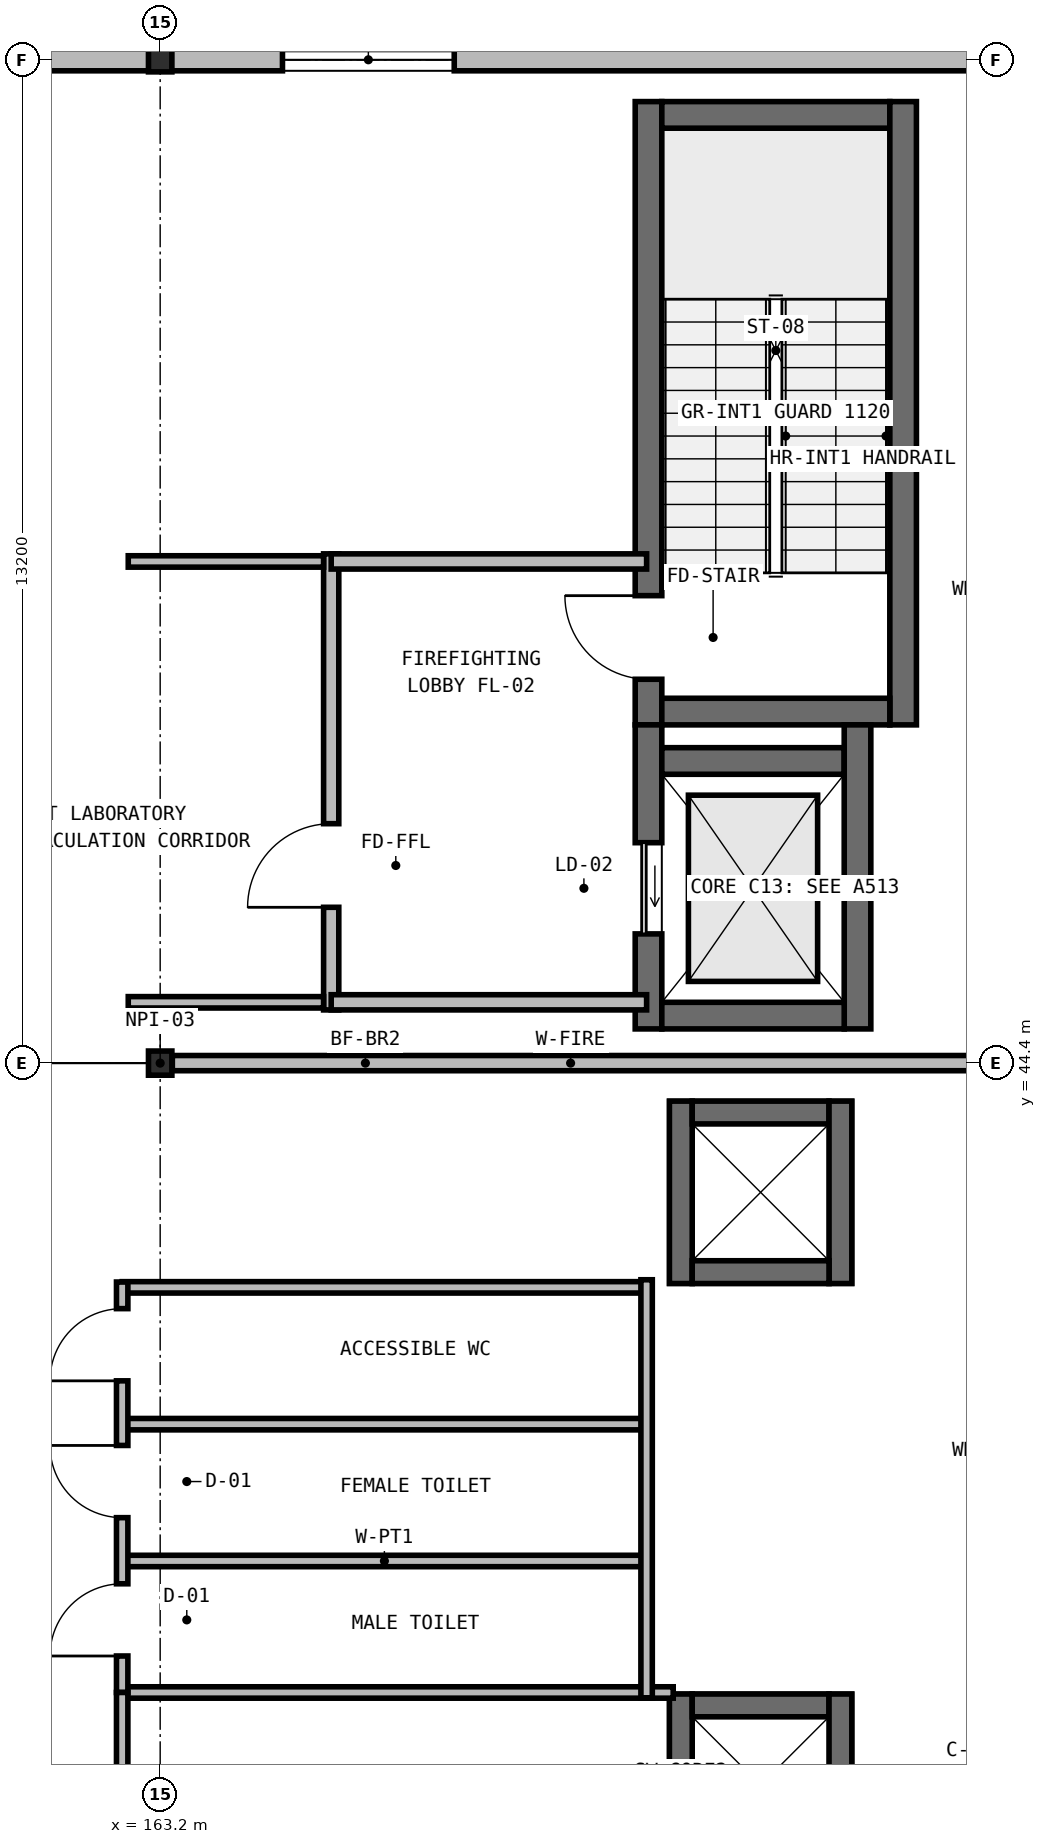
"""IFC4 building model, lengths in metres.
Left out: names, types, materials, properties, quantities, classifications, styles, units other than length and angle.
Written with IfcOpenShell. Run it as: python <this file> out.ifc"""

import sys

from ifc_helpers import new_model, si_unit, direction, frame, frame_2d, origin, origin_2d, place, context, subcontext, project, spatial, rectangle, i_section, extrude, element, fill, save


model = new_model("IFC4")
c1 = context("Model", 3, precision=1e-05, world=origin(), true_north=direction((0.0, 1.0)))
c2 = subcontext(c1, "Body", "Model", "MODEL_VIEW")
j1 = project(units=[si_unit("LENGTHUNIT", "METRE"), si_unit("PLANEANGLEUNIT", "RADIAN")], contexts=[c1])
p1 = place(None, origin())
s1 = spatial("IfcSite", under=j1, at=p1, CompositionType="ELEMENT")
p2 = place(p1, origin())
s2 = spatial("IfcBuilding", under=s1, at=p2, CompositionType="ELEMENT")
p3 = place(p2, frame((0.0, 0.0, 41.65)))
s3 = spatial("IfcBuildingStorey", under=s2, at=p3, CompositionType="ELEMENT", Elevation=41.65)
p4 = place(p3, frame((169.625, 48.85, 0.0), z_axis=(0.0, 0.0, 1.0), x_axis=(0.0, 1.0, 0.0)))
e1 = element("IfcWall", 1, at=p4, inside=s3, PredefinedType="SHEAR", context=c2, shape_type="SweptSolid", body=[
    extrude(rectangle(XDim=8.2, YDim=0.35, at=frame_2d((4.1, 0.0))), origin(), (0.0, 0.0, 1.0), 4.55),
])
p5 = place(p4, frame((0.6, 0.0, 0.0)))
e2 = element("IfcOpeningElement", 2, at=p5, cuts=e1, PredefinedType="OPENING", context=c2, shape_type="SweptSolid", body=[
    extrude(rectangle(XDim=1.1, YDim=2.15, at=frame_2d((0.55, 1.075))), frame((0.0, 0.185, 0.0), z_axis=(0.0, -1.0, 0.0), x_axis=(1.0, 0.0, 0.0)), (0.0, 0.0, 1.0), 0.37),
])
p6 = place(p3, frame((169.8, 56.875, 0.0), z_axis=(0.0, 0.0, 1.0), x_axis=(1.0, 0.0, 0.0)))
e3 = element("IfcWall", 3, at=p6, inside=s3, PredefinedType="SHEAR", context=c2, shape_type="SweptSolid", body=[
    extrude(rectangle(XDim=3.0, YDim=0.35, at=frame_2d((1.5, 0.0))), origin(), (0.0, 0.0, 1.0), 4.55),
])
p7 = place(p3, frame((172.975, 57.05, 0.0), z_axis=(0.0, 0.0, 1.0), x_axis=(0.0, -1.0, 0.0)))
e4 = element("IfcWall", 4, at=p7, inside=s3, PredefinedType="SHEAR", context=c2, shape_type="SweptSolid", body=[
    extrude(rectangle(XDim=8.2, YDim=0.35, at=frame_2d((4.1, 0.0))), origin(), (0.0, 0.0, 1.0), 4.55),
])
p8 = place(p3, frame((172.8, 49.025, 0.0), z_axis=(0.0, 0.0, 1.0), x_axis=(-1.0, 0.0, 0.0)))
e5 = element("IfcWall", 5, at=p8, inside=s3, PredefinedType="SHEAR", context=c2, shape_type="SweptSolid", body=[
    extrude(rectangle(XDim=3.0, YDim=0.35, at=frame_2d((1.5, 0.0))), origin(), (0.0, 0.0, 1.0), 4.55),
])
p9 = place(p3, frame((169.625, 44.85, 0.0), z_axis=(0.0, 0.0, 1.0), x_axis=(0.0, 1.0, 0.0)))
e6 = element("IfcWall", 6, at=p9, inside=s3, PredefinedType="SHEAR", context=c2, shape_type="SweptSolid", body=[
    extrude(rectangle(XDim=4.0, YDim=0.35, at=frame_2d((2.0, 0.0))), origin(), (0.0, 0.0, 1.0), 4.55),
])
p10 = place(p9, frame((1.25, 0.0, 0.0)))
e7 = element("IfcOpeningElement", 7, at=p10, cuts=e6, PredefinedType="OPENING", context=c2, shape_type="SweptSolid", body=[
    extrude(rectangle(XDim=1.2, YDim=2.15, at=frame_2d((0.6, 1.075))), frame((0.0, 0.185, 0.0), z_axis=(0.0, -1.0, 0.0), x_axis=(1.0, 0.0, 0.0)), (0.0, 0.0, 1.0), 0.37),
])
p11 = place(p3, frame((169.8, 48.375, 0.0), z_axis=(0.0, 0.0, 1.0), x_axis=(1.0, 0.0, 0.0)))
e8 = element("IfcWall", 8, at=p11, inside=s3, PredefinedType="SHEAR", context=c2, shape_type="SweptSolid", body=[
    extrude(rectangle(XDim=2.4, YDim=0.35, at=frame_2d((1.2, 0.0))), origin(), (0.0, 0.0, 1.0), 4.55),
])
p12 = place(p3, frame((172.375, 48.85, 0.0), z_axis=(0.0, 0.0, 1.0), x_axis=(0.0, -1.0, 0.0)))
e9 = element("IfcWall", 9, at=p12, inside=s3, PredefinedType="SHEAR", context=c2, shape_type="SweptSolid", body=[
    extrude(rectangle(XDim=4.0, YDim=0.35, at=frame_2d((2.0, 0.0))), origin(), (0.0, 0.0, 1.0), 4.55),
])
p13 = place(p3, frame((172.2, 45.025, 0.0), z_axis=(0.0, 0.0, 1.0), x_axis=(-1.0, 0.0, 0.0)))
e10 = element("IfcWall", 10, at=p13, inside=s3, PredefinedType="SHEAR", context=c2, shape_type="SweptSolid", body=[
    extrude(rectangle(XDim=2.4, YDim=0.35, at=frame_2d((1.2, 0.0))), origin(), (0.0, 0.0, 1.0), 4.55),
])
for number, where, z_axis, x_axis in (
    (11, (163.2, 44.4, 0.0), (0.0, 0.0, 1.0), (1.0, 0.0, 0.0)),
    (12, (163.2, 57.6, 0.0), (0.0, 0.0, 1.0), (1.0, 0.0, 0.0)),
):
    element("IfcColumn", number, at=place(p3, frame(where, z_axis=z_axis, x_axis=x_axis)), inside=s3, PredefinedType="COLUMN", context=c2, shape_type="SweptSolid", body=[
        extrude(i_section(OverallWidth=0.308, OverallDepth=0.318, WebThickness=0.013, FlangeThickness=0.021, at=origin_2d()), origin(), (0.0, 0.0, 1.0), 4.55),
    ])
p14 = place(p3, frame((170.05, 33.45, 0.0), z_axis=(0.0, 0.0, 1.0), x_axis=(0.0, 1.0, 0.0)))
e13 = element("IfcWall", 13, at=p14, inside=s3, PredefinedType="SHEAR", context=c2, shape_type="SweptSolid", body=[
    extrude(rectangle(XDim=2.65, YDim=0.3, at=frame_2d((1.325, 0.0))), origin(), (0.0, 0.0, 1.0), 4.37),
])
p15 = place(p3, frame((170.2, 35.95, 0.0), z_axis=(0.0, 0.0, 1.0), x_axis=(1.0, 0.0, 0.0)))
e14 = element("IfcWall", 14, at=p15, inside=s3, PredefinedType="SHEAR", context=c2, shape_type="SweptSolid", body=[
    extrude(rectangle(XDim=1.8, YDim=0.3, at=frame_2d((0.9, 0.0))), origin(), (0.0, 0.0, 1.0), 4.37),
])
p16 = place(p3, frame((172.15, 36.1, 0.0), z_axis=(0.0, 0.0, 1.0), x_axis=(0.0, -1.0, 0.0)))
e15 = element("IfcWall", 15, at=p16, inside=s3, PredefinedType="SHEAR", context=c2, shape_type="SweptSolid", body=[
    extrude(rectangle(XDim=2.65, YDim=0.3, at=frame_2d((1.325, 0.0))), origin(), (0.0, 0.0, 1.0), 4.37),
])
p17 = place(p3, frame((170.05, 41.5, 0.0), z_axis=(0.0, 0.0, 1.0), x_axis=(0.0, 1.0, 0.0)))
e16 = element("IfcWall", 16, at=p17, inside=s3, PredefinedType="SHEAR", context=c2, shape_type="SweptSolid", body=[
    extrude(rectangle(XDim=2.4, YDim=0.3, at=frame_2d((1.2, 0.0))), origin(), (0.0, 0.0, 1.0), 4.37),
])
p18 = place(p3, frame((170.2, 43.75, 0.0), z_axis=(0.0, 0.0, 1.0), x_axis=(1.0, 0.0, 0.0)))
e17 = element("IfcWall", 17, at=p18, inside=s3, PredefinedType="SHEAR", context=c2, shape_type="SweptSolid", body=[
    extrude(rectangle(XDim=1.8, YDim=0.3, at=frame_2d((0.9, 0.0))), origin(), (0.0, 0.0, 1.0), 4.37),
])
p19 = place(p3, frame((172.15, 43.9, 0.0), z_axis=(0.0, 0.0, 1.0), x_axis=(0.0, -1.0, 0.0)))
e18 = element("IfcWall", 18, at=p19, inside=s3, PredefinedType="SHEAR", context=c2, shape_type="SweptSolid", body=[
    extrude(rectangle(XDim=2.4, YDim=0.3, at=frame_2d((1.2, 0.0))), origin(), (0.0, 0.0, 1.0), 4.37),
])
p20 = place(p3, frame((172.0, 41.65, 0.0), z_axis=(0.0, 0.0, 1.0), x_axis=(-1.0, 0.0, 0.0)))
e19 = element("IfcWall", 19, at=p20, inside=s3, PredefinedType="SHEAR", context=c2, shape_type="SweptSolid", body=[
    extrude(rectangle(XDim=1.8, YDim=0.3, at=frame_2d((0.9, 0.0))), origin(), (0.0, 0.0, 1.0), 4.37),
])
p21 = place(p3, frame((153.455, 57.6, 0.0), z_axis=(0.0, 0.0, 1.0), x_axis=(1.0, 0.0, 0.0)))
e20 = element("IfcWall", 20, at=p21, inside=s3, PredefinedType="SOLIDWALL", context=c2, shape_type="SweptSolid", body=[
    extrude(rectangle(XDim=9.741, YDim=0.29, at=frame_2d((4.871, 0.0))), origin(), (0.0, 0.0, 1.0), 3.748),
])
p22 = place(p21, frame((1.47, 0.0, 0.95)))
e21 = element("IfcOpeningElement", 21, at=p22, cuts=e20, PredefinedType="OPENING", context=c2, shape_type="SweptSolid", body=[
    extrude(rectangle(XDim=1.93, YDim=1.8, at=frame_2d((0.965, 0.9))), frame((0.0, 0.155, 0.0), z_axis=(0.0, -1.0, 0.0), x_axis=(1.0, 0.0, 0.0)), (0.0, 0.0, 1.0), 0.31),
])
p23 = place(p3, frame((163.204, 57.6, 0.0), z_axis=(0.0, 0.0, 1.0), x_axis=(1.0, 0.0, 0.0)))
e22 = element("IfcWall", 22, at=p23, inside=s3, PredefinedType="SOLIDWALL", context=c2, shape_type="SweptSolid", body=[
    extrude(rectangle(XDim=10.941, YDim=0.29, at=frame_2d((5.47, 0.0))), origin(), (0.0, 0.0, 1.0), 3.67),
])
p24 = place(p23, frame((1.605, 0.0, 0.95)))
e23 = element("IfcOpeningElement", 23, at=p24, cuts=e22, PredefinedType="OPENING", context=c2, shape_type="SweptSolid", body=[
    extrude(rectangle(XDim=2.26, YDim=1.72, at=frame_2d((1.13, 0.86))), frame((0.0, 0.155, 0.0), z_axis=(0.0, -1.0, 0.0), x_axis=(1.0, 0.0, 0.0)), (0.0, 0.0, 1.0), 0.31),
])
p25 = place(p3, frame((163.36, 44.4, 0.0), z_axis=(0.0, 0.0, 1.0), x_axis=(1.0, 0.0, 0.0)))
e24 = element("IfcWall", 24, at=p25, inside=s3, PredefinedType="SOLIDWALL", context=c2, shape_type="SweptSolid", body=[
    extrude(rectangle(XDim=10.48, YDim=0.2, at=frame_2d((5.24, 0.0))), origin(), (0.0, 0.0, 1.0), 3.675),
])
p26 = place(p3, frame((165.45, 45.1, 0.0), z_axis=(0.0, 0.0, 1.0), x_axis=(0.0, 1.0, 0.0)))
e25 = element("IfcWall", 25, at=p26, inside=s3, PredefinedType="SOLIDWALL", context=c2, shape_type="SweptSolid", body=[
    extrude(rectangle(XDim=6.0, YDim=0.2, at=frame_2d((3.0, 0.0))), origin(), (0.0, 0.0, 1.0), 4.3),
])
p27 = place(p26, frame((1.35, 0.0, 0.0)))
e26 = element("IfcOpeningElement", 26, at=p27, cuts=e25, PredefinedType="OPENING", context=c2, shape_type="SweptSolid", body=[
    extrude(rectangle(XDim=1.1, YDim=2.15, at=frame_2d((0.55, 1.075))), frame((0.0, 0.11, 0.0), z_axis=(0.0, -1.0, 0.0), x_axis=(1.0, 0.0, 0.0)), (0.0, 0.0, 1.0), 0.22),
])
for number, where, z_axis, x_axis in (
    (27, (165.45, 45.2, 0.0), (0.0, 0.0, 1.0), (1.0, 0.0, 0.0)),
    (28, (165.45, 51.0, 0.0), (0.0, 0.0, 1.0), (1.0, 0.0, 0.0)),
):
    element("IfcWall", number, at=place(p3, frame(where, z_axis=z_axis, x_axis=x_axis)), inside=s3, PredefinedType="SOLIDWALL", context=c2, shape_type="SweptSolid", body=[
        extrude(rectangle(XDim=4.15, YDim=0.2, at=frame_2d((2.075, 0.0))), origin(), (0.0, 0.0, 1.0), 4.3),
    ])
p28 = place(p3, frame((162.7, 37.85, 0.0), z_axis=(0.0, 0.0, 1.0), x_axis=(1.0, 0.0, 0.0)))
e29 = element("IfcWall", 29, at=p28, inside=s3, PredefinedType="PARTITIONING", context=c2, shape_type="SweptSolid", body=[
    extrude(rectangle(XDim=6.9, YDim=0.15, at=frame_2d((3.45, 0.0))), origin(), (0.0, 0.0, 1.0), 4.3),
])
p29 = place(p3, frame((162.7, 39.65, 0.0), z_axis=(0.0, 0.0, 1.0), x_axis=(1.0, 0.0, 0.0)))
e30 = element("IfcWall", 30, at=p29, inside=s3, PredefinedType="PARTITIONING", context=c2, shape_type="SweptSolid", body=[
    extrude(rectangle(XDim=6.9, YDim=0.15, at=frame_2d((3.45, 0.0))), origin(), (0.0, 0.0, 1.0), 3.441),
])
p30 = place(p3, frame((162.7, 41.45, 0.0), z_axis=(0.0, 0.0, 1.0), x_axis=(1.0, 0.0, 0.0)))
e31 = element("IfcWall", 31, at=p30, inside=s3, PredefinedType="PARTITIONING", context=c2, shape_type="SweptSolid", body=[
    extrude(rectangle(XDim=6.9, YDim=0.15, at=frame_2d((3.45, 0.0))), origin(), (0.0, 0.0, 1.0), 4.3),
])
p31 = place(p3, frame((162.7, 36.12, 0.0), z_axis=(0.0, 0.0, 1.0), x_axis=(1.0, 0.0, 0.0)))
e32 = element("IfcWall", 32, at=p31, inside=s3, PredefinedType="PARTITIONING", context=c2, shape_type="SweptSolid", body=[
    extrude(rectangle(XDim=7.25, YDim=0.15, at=frame_2d((3.625, 0.0))), origin(), (0.0, 0.0, 1.0), 4.3),
])
p32 = place(p3, frame((169.6, 36.05, 0.0), z_axis=(0.0, 0.0, 1.0), x_axis=(0.0, 1.0, 0.0)))
e33 = element("IfcWall", 33, at=p32, inside=s3, PredefinedType="PARTITIONING", context=c2, shape_type="SweptSolid", body=[
    extrude(rectangle(XDim=5.5, YDim=0.15, at=frame_2d((2.75, 0.0))), origin(), (0.0, 0.0, 1.0), 4.3),
])
p33 = place(p3, frame((162.7, 36.12, 0.0), z_axis=(0.0, 0.0, 1.0), x_axis=(0.0, 1.0, 0.0)))
e34 = element("IfcWall", 34, at=p33, inside=s3, PredefinedType="PARTITIONING", context=c2, shape_type="SweptSolid", body=[
    extrude(rectangle(XDim=5.4, YDim=0.15, at=frame_2d((2.7, 0.0))), origin(), (0.0, 0.0, 1.0), 4.3),
])
p34 = place(p33, frame((0.48, 0.0, 0.0)))
e35 = element("IfcOpeningElement", 35, at=p34, cuts=e34, PredefinedType="OPENING", context=c2, shape_type="SweptSolid", body=[
    extrude(rectangle(XDim=0.95, YDim=2.1, at=frame_2d((0.475, 1.05))), frame((0.0, 0.085, 0.0), z_axis=(0.0, -1.0, 0.0), x_axis=(1.0, 0.0, 0.0)), (0.0, 0.0, 1.0), 0.17),
])
p35 = place(p33, frame((2.3, 0.0, 0.0)))
e36 = element("IfcOpeningElement", 36, at=p35, cuts=e34, PredefinedType="OPENING", context=c2, shape_type="SweptSolid", body=[
    extrude(rectangle(XDim=0.95, YDim=2.1, at=frame_2d((0.475, 1.05))), frame((0.0, 0.085, 0.0), z_axis=(0.0, -1.0, 0.0), x_axis=(1.0, 0.0, 0.0)), (0.0, 0.0, 1.0), 0.17),
])
p36 = place(p33, frame((4.1, 0.0, 0.0)))
e37 = element("IfcOpeningElement", 37, at=p36, cuts=e34, PredefinedType="OPENING", context=c2, shape_type="SweptSolid", body=[
    extrude(rectangle(XDim=0.95, YDim=2.1, at=frame_2d((0.475, 1.05))), frame((0.0, 0.085, 0.0), z_axis=(0.0, -1.0, 0.0), x_axis=(1.0, 0.0, 0.0)), (0.0, 0.0, 1.0), 0.17),
])
p37 = place(p3, frame((162.7, 27.2, 0.0), z_axis=(0.0, 0.0, 1.0), x_axis=(0.0, 1.0, 0.0)))
e38 = element("IfcWall", 38, at=p37, inside=s3, PredefinedType="PARTITIONING", context=c2, shape_type="SweptSolid", body=[
    extrude(rectangle(XDim=8.92, YDim=0.15, at=frame_2d((4.46, 0.0))), origin(), (0.0, 0.0, 1.0), 4.3),
])
p38 = place(p37, frame((2.6, 0.0, 0.0)))
e39 = element("IfcOpeningElement", 39, at=p38, cuts=e38, PredefinedType="OPENING", context=c2, shape_type="SweptSolid", body=[
    extrude(rectangle(XDim=1.1, YDim=2.2, at=frame_2d((0.55, 1.1))), frame((0.0, 0.085, 0.0), z_axis=(0.0, -1.0, 0.0), x_axis=(1.0, 0.0, 0.0)), (0.0, 0.0, 1.0), 0.17),
])
for number, where, z_axis, x_axis in (
    (40, (162.78, 45.2, 0.0), (0.0, 0.0, 1.0), (1.0, 0.0, 0.0)),
    (41, (162.78, 51.0, 0.0), (0.0, 0.0, 1.0), (1.0, 0.0, 0.0)),
):
    element("IfcWall", number, at=place(p3, frame(where, z_axis=z_axis, x_axis=x_axis)), inside=s3, PredefinedType="PARTITIONING", context=c2, shape_type="SweptSolid", body=[
        extrude(rectangle(XDim=2.57, YDim=0.15, at=frame_2d((1.285, 0.0))), origin(), (0.0, 0.0, 1.0), 4.3),
    ])
p39 = place(p24, origin())
e42 = element("IfcWindow", 42, at=p39, inside=s3, PartitioningType="SINGLE_PANEL", PredefinedType="WINDOW", context=c2, shape_type="SweptSolid", body=[
    extrude(rectangle(XDim=2.26, YDim=1.72, at=frame_2d((1.13, 0.86))), frame((0.0, 0.03, 0.0), z_axis=(0.0, -1.0, 0.0), x_axis=(1.0, 0.0, 0.0)), (0.0, 0.0, 1.0), 0.06),
])
fill(e23, e42)
p40 = place(p5, origin())
e43 = element("IfcDoor", 43, at=p40, inside=s3, OperationType="SINGLE_SWING_RIGHT", PredefinedType="DOOR", context=c2, shape_type="SweptSolid", body=[
    extrude(rectangle(XDim=1.1, YDim=2.15, at=frame_2d((0.55, 1.075))), frame((0.0, 0.025, 0.0), z_axis=(0.0, -1.0, 0.0), x_axis=(1.0, 0.0, 0.0)), (0.0, 0.0, 1.0), 0.05),
])
fill(e2, e43)
p41 = place(p10, origin())
e44 = element("IfcDoor", 44, at=p41, inside=s3, OperationType="SLIDING_TO_LEFT", PredefinedType="USERDEFINED", context=c2, shape_type="SweptSolid", body=[
    extrude(rectangle(XDim=1.2, YDim=2.15, at=frame_2d((0.6, 1.075))), frame((0.0, 0.025, 0.0), z_axis=(0.0, -1.0, 0.0), x_axis=(1.0, 0.0, 0.0)), (0.0, 0.0, 1.0), 0.05),
])
fill(e7, e44)
p42 = place(p27, origin())
e45 = element("IfcDoor", 45, at=p42, inside=s3, OperationType="SINGLE_SWING_LEFT", PredefinedType="DOOR", context=c2, shape_type="SweptSolid", body=[
    extrude(rectangle(XDim=1.1, YDim=2.15, at=frame_2d((0.55, 1.075))), frame((0.0, 0.025, 0.0), z_axis=(0.0, -1.0, 0.0), x_axis=(1.0, 0.0, 0.0)), (0.0, 0.0, 1.0), 0.05),
])
fill(e26, e45)
p43 = place(p34, origin())
e46 = element("IfcDoor", 46, at=p43, inside=s3, OperationType="SINGLE_SWING_LEFT", PredefinedType="DOOR", context=c2, shape_type="SweptSolid", body=[
    extrude(rectangle(XDim=0.95, YDim=2.1, at=frame_2d((0.475, 1.05))), frame((0.0, 0.025, 0.0), z_axis=(0.0, -1.0, 0.0), x_axis=(1.0, 0.0, 0.0)), (0.0, 0.0, 1.0), 0.05),
])
fill(e35, e46)
p44 = place(p35, origin())
e47 = element("IfcDoor", 47, at=p44, inside=s3, OperationType="SINGLE_SWING_RIGHT", PredefinedType="DOOR", context=c2, shape_type="SweptSolid", body=[
    extrude(rectangle(XDim=0.95, YDim=2.1, at=frame_2d((0.475, 1.05))), frame((0.0, 0.025, 0.0), z_axis=(0.0, -1.0, 0.0), x_axis=(1.0, 0.0, 0.0)), (0.0, 0.0, 1.0), 0.05),
])
fill(e36, e47)
p45 = place(p36, origin())
e48 = element("IfcDoor", 48, at=p45, inside=s3, OperationType="SINGLE_SWING_LEFT", PredefinedType="DOOR", context=c2, shape_type="SweptSolid", body=[
    extrude(rectangle(XDim=0.95, YDim=2.1, at=frame_2d((0.475, 1.05))), frame((0.0, 0.025, 0.0), z_axis=(0.0, -1.0, 0.0), x_axis=(1.0, 0.0, 0.0)), (0.0, 0.0, 1.0), 0.05),
])
fill(e37, e48)
save(model, sys.argv[1])
